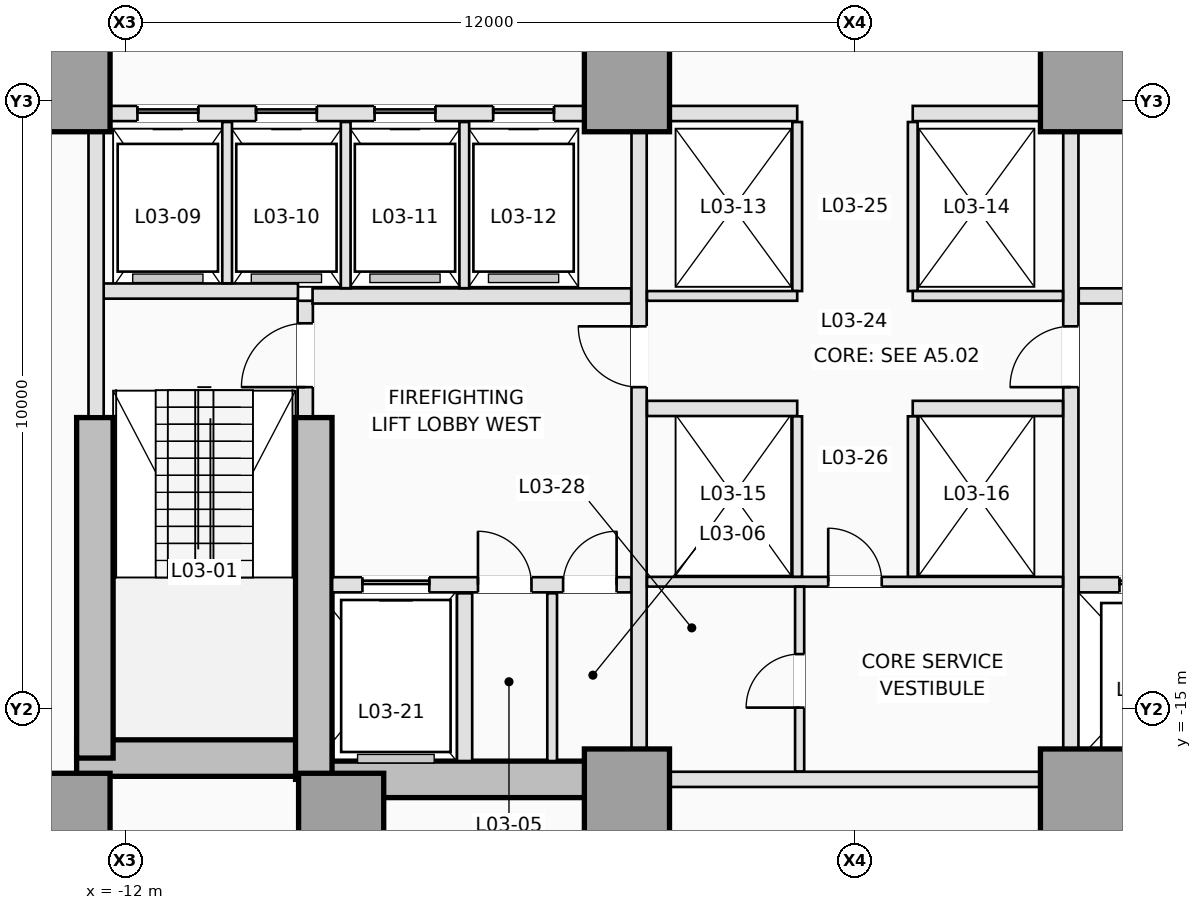
"""IFC4 building model, lengths in metres.
Left out: names, types, materials, properties, quantities, classifications, styles, units other than length and angle.
Written with IfcOpenShell. Run it as: python <this file> out.ifc"""

import sys

from ifc_helpers import new_model, si_unit, direction, frame, frame_2d, origin, origin_2d, place, context, subcontext, project, spatial, rectangle, extrude, element, fill, save


model = new_model("IFC4")
c1 = context("Model", 3, precision=1e-05, world=origin(), true_north=direction((0.0, 1.0)))
c2 = subcontext(c1, "Body", "Model", "MODEL_VIEW")
j1 = project(units=[si_unit("LENGTHUNIT", "METRE"), si_unit("PLANEANGLEUNIT", "RADIAN")], contexts=[c1])
p1 = place(None, origin())
s1 = spatial("IfcSite", under=j1, at=p1, CompositionType="ELEMENT")
p2 = place(p1, origin())
s2 = spatial("IfcBuilding", under=s1, at=p2, CompositionType="ELEMENT")
p3 = place(p2, frame((0.0, 0.0, 14.0)))
s3 = spatial("IfcBuildingStorey", under=s2, at=p3, CompositionType="ELEMENT", Elevation=14.0)
p4 = place(p3, frame((-12.8, -15.8, 0.0), z_axis=(0.0, 0.0, 1.0), x_axis=(1.0, 0.0, 0.0)))
e1 = element("IfcWall", 1, at=p4, inside=s3, PredefinedType="SHEAR", context=c2, shape_type="SweptSolid", body=[
    extrude(rectangle(XDim=4.2, YDim=0.6, at=frame_2d((2.1, 0.0))), origin(), (0.0, 0.0, 1.0), 4.5),
])
for number, where, z_axis, x_axis in (
    (2, (-8.9, -16.15, 0.0), (0.0, 0.0, 1.0), (1.0, 0.0, 0.0)),
    (3, (3.75, -16.15, 0.0), (0.0, 0.0, 1.0), (1.0, 0.0, 0.0)),
):
    element("IfcWall", number, at=place(p3, frame(where, z_axis=z_axis, x_axis=x_axis)), inside=s3, PredefinedType="SHEAR", context=c2, shape_type="SweptSolid", body=[
        extrude(rectangle(XDim=5.15, YDim=0.6, at=frame_2d((2.575, 0.0))), origin(), (0.0, 0.0, 1.0), 4.5),
    ])
p5 = place(p3, frame((-12.5, -15.8, 0.0), z_axis=(0.0, 0.0, 1.0), x_axis=(0.0, 1.0, 0.0)))
e4 = element("IfcWall", 4, at=p5, inside=s3, PredefinedType="SHEAR", context=c2, shape_type="SweptSolid", body=[
    extrude(rectangle(XDim=5.6, YDim=0.6, at=frame_2d((2.8, 0.0))), origin(), (0.0, 0.0, 1.0), 4.5),
])
p6 = place(p3, frame((-8.9, -16.15, 0.0), z_axis=(0.0, 0.0, 1.0), x_axis=(0.0, 1.0, 0.0)))
e5 = element("IfcWall", 5, at=p6, inside=s3, PredefinedType="SHEAR", context=c2, shape_type="SweptSolid", body=[
    extrude(rectangle(XDim=5.95, YDim=0.6, at=frame_2d((2.975, 0.0))), origin(), (0.0, 0.0, 1.0), 4.5),
])
for number, where, z_axis, x_axis in (
    (6, (-12.95, -16.75, 0.0), (0.0, 0.0, 1.0), (1.0, 0.0, 0.0)),
    (7, (-8.45, -16.75, 0.0), (0.0, 0.0, 1.0), (1.0, 0.0, 0.0)),
    (8, (-3.75, -16.35, 0.0), (0.0, 0.0, 1.0), (1.0, 0.0, 0.0)),
    (9, (3.75, -16.35, 0.0), (0.0, 0.0, 1.0), (1.0, 0.0, 0.0)),
    (10, (-12.95, -4.8, 0.0), (0.0, 0.0, 1.0), (1.0, 0.0, 0.0)),
    (11, (-3.75, -4.8, 0.0), (0.0, 0.0, 1.0), (1.0, 0.0, 0.0)),
    (12, (3.75, -4.8, 0.0), (0.0, 0.0, 1.0), (1.0, 0.0, 0.0)),
):
    element("IfcColumn", number, at=place(p3, frame(where, z_axis=z_axis, x_axis=x_axis)), inside=s3, PredefinedType="COLUMN", context=c2, shape_type="SweptSolid", body=[
        extrude(rectangle(XDim=1.4, YDim=1.4, at=origin_2d()), origin(), (0.0, 0.0, 1.0), 4.5),
    ])
p7 = place(p3, frame((-9.04, -10.18, 0.0), z_axis=(0.0, 0.0, 1.0), x_axis=(0.0, 1.0, 0.0)))
e13 = element("IfcWall", 13, at=p7, inside=s3, PredefinedType="PARTITIONING", context=c2, shape_type="SweptSolid", body=[
    extrude(rectangle(XDim=1.9, YDim=0.25, at=frame_2d((0.95, 0.0))), origin(), (0.0, 0.0, 1.0), 4.2),
])
p8 = place(p7, frame((0.48, 0.0, 0.0)))
e14 = element("IfcOpeningElement", 14, at=p8, cuts=e13, PredefinedType="OPENING", context=c2, shape_type="SweptSolid", body=[
    extrude(rectangle(XDim=1.05, YDim=2.15, at=frame_2d((0.525, 1.075))), frame((0.0, 0.135, 0.0), z_axis=(0.0, -1.0, 0.0), x_axis=(1.0, 0.0, 0.0)), (0.0, 0.0, 1.0), 0.27),
])
p9 = place(p3, frame((-12.38, -8.12, 0.0), z_axis=(0.0, 0.0, 1.0), x_axis=(1.0, 0.0, 0.0)))
e15 = element("IfcWall", 15, at=p9, inside=s3, PredefinedType="PARTITIONING", context=c2, shape_type="SweptSolid", body=[
    extrude(rectangle(XDim=3.22, YDim=0.25, at=frame_2d((1.61, 0.0))), origin(), (0.0, 0.0, 1.0), 4.2),
])
p10 = place(p3, frame((-12.48, -10.18, 0.0), z_axis=(0.0, 0.0, 1.0), x_axis=(0.0, 1.0, 0.0)))
e16 = element("IfcWall", 16, at=p10, inside=s3, PredefinedType="PARTITIONING", context=c2, shape_type="SweptSolid", body=[
    extrude(rectangle(XDim=4.678, YDim=0.25, at=frame_2d((2.339, 0.0))), origin(), (0.0, 0.0, 1.0), 4.2),
])
p11 = place(p3, frame((-8.598, -12.95, 0.0), z_axis=(0.0, 0.0, 1.0), x_axis=(1.0, 0.0, 0.0)))
e17 = element("IfcWall", 17, at=p11, inside=s3, PredefinedType="PARTITIONING", context=c2, shape_type="SweptSolid", body=[
    extrude(rectangle(XDim=4.918, YDim=0.25, at=frame_2d((2.459, 0.0))), origin(), (0.0, 0.0, 1.0), 4.2),
])
p12 = place(p11, frame((0.498, 0.0, 0.0)))
e18 = element("IfcOpeningElement", 18, at=p12, cuts=e17, PredefinedType="OPENING", context=c2, shape_type="SweptSolid", body=[
    extrude(rectangle(XDim=1.1, YDim=2.15, at=frame_2d((0.55, 1.075))), frame((0.0, 0.135, 0.0), z_axis=(0.0, -1.0, 0.0), x_axis=(1.0, 0.0, 0.0)), (0.0, 0.0, 1.0), 0.27),
])
p13 = place(p11, frame((2.398, 0.0, 0.0)))
e19 = element("IfcOpeningElement", 19, at=p13, cuts=e17, PredefinedType="OPENING", context=c2, shape_type="SweptSolid", body=[
    extrude(rectangle(XDim=0.88, YDim=2.1, at=frame_2d((0.44, 1.05))), frame((0.0, 0.135, 0.0), z_axis=(0.0, -1.0, 0.0), x_axis=(1.0, 0.0, 0.0)), (0.0, 0.0, 1.0), 0.27),
])
p14 = place(p11, frame((3.798, 0.0, 0.0)))
e20 = element("IfcOpeningElement", 20, at=p14, cuts=e17, PredefinedType="OPENING", context=c2, shape_type="SweptSolid", body=[
    extrude(rectangle(XDim=0.88, YDim=2.1, at=frame_2d((0.44, 1.05))), frame((0.0, 0.135, 0.0), z_axis=(0.0, -1.0, 0.0), x_axis=(1.0, 0.0, 0.0)), (0.0, 0.0, 1.0), 0.27),
])
p15 = place(p3, frame((3.68, -12.95, 0.0), z_axis=(0.0, 0.0, 1.0), x_axis=(1.0, 0.0, 0.0)))
e21 = element("IfcWall", 21, at=p15, inside=s3, PredefinedType="PARTITIONING", context=c2, shape_type="SweptSolid", body=[
    extrude(rectangle(XDim=4.918, YDim=0.25, at=frame_2d((2.459, 0.0))), origin(), (0.0, 0.0, 1.0), 4.2),
])
p16 = place(p15, frame((3.32, 0.0, 0.0)))
e22 = element("IfcOpeningElement", 22, at=p16, cuts=e21, PredefinedType="OPENING", context=c2, shape_type="SweptSolid", body=[
    extrude(rectangle(XDim=1.1, YDim=2.15, at=frame_2d((0.55, 1.075))), frame((0.0, 0.135, 0.0), z_axis=(0.0, -1.0, 0.0), x_axis=(1.0, 0.0, 0.0)), (0.0, 0.0, 1.0), 0.27),
])
p17 = place(p15, frame((0.67, 0.0, 0.0)))
e23 = element("IfcOpeningElement", 23, at=p17, cuts=e21, PredefinedType="OPENING", context=c2, shape_type="SweptSolid", body=[
    extrude(rectangle(XDim=1.2, YDim=2.15, at=frame_2d((0.6, 1.075))), frame((0.0, 0.135, 0.0), z_axis=(0.0, -1.0, 0.0), x_axis=(1.0, 0.0, 0.0)), (0.0, 0.0, 1.0), 0.27),
])
p18 = place(p3, frame((-6.42, -15.848, 0.0), z_axis=(0.0, 0.0, 1.0), x_axis=(0.0, 1.0, 0.0)))
e24 = element("IfcWall", 24, at=p18, inside=s3, PredefinedType="PARTITIONING", context=c2, shape_type="SweptSolid", body=[
    extrude(rectangle(XDim=2.758, YDim=0.25, at=frame_2d((1.379, 0.0))), origin(), (0.0, 0.0, 1.0), 4.2),
])
p19 = place(p3, frame((-4.98, -15.848, 0.0), z_axis=(0.0, 0.0, 1.0), x_axis=(0.0, 1.0, 0.0)))
e25 = element("IfcWall", 25, at=p19, inside=s3, PredefinedType="PARTITIONING", context=c2, shape_type="SweptSolid", body=[
    extrude(rectangle(XDim=2.758, YDim=0.16, at=frame_2d((1.379, 0.0))), origin(), (0.0, 0.0, 1.0), 4.2),
])
for number, where, z_axis, x_axis in (
    (26, (-8.92, -8.2, 0.0), (0.0, 0.0, 1.0), (1.0, 0.0, 0.0)),
    (27, (3.68, -8.2, 0.0), (0.0, 0.0, 1.0), (1.0, 0.0, 0.0)),
):
    element("IfcWall", number, at=place(p3, frame(where, z_axis=z_axis, x_axis=x_axis)), inside=s3, PredefinedType="PARTITIONING", context=c2, shape_type="SweptSolid", body=[
        extrude(rectangle(XDim=5.24, YDim=0.25, at=frame_2d((2.62, 0.0))), origin(), (0.0, 0.0, 1.0), 4.2),
    ])
p20 = place(p3, frame((-3.55, -15.648, 0.0), z_axis=(0.0, 0.0, 1.0), x_axis=(0.0, 1.0, 0.0)))
e28 = element("IfcWall", 28, at=p20, inside=s3, PredefinedType="PARTITIONING", context=c2, shape_type="SweptSolid", body=[
    extrude(rectangle(XDim=10.146, YDim=0.25, at=frame_2d((5.073, 0.0))), origin(), (0.0, 0.0, 1.0), 4.2),
])
p21 = place(p20, frame((5.948, 0.0, 0.0)))
e29 = element("IfcOpeningElement", 29, at=p21, cuts=e28, PredefinedType="OPENING", context=c2, shape_type="SweptSolid", body=[
    extrude(rectangle(XDim=1.0, YDim=2.15, at=frame_2d((0.5, 1.075))), frame((0.0, 0.135, 0.0), z_axis=(0.0, -1.0, 0.0), x_axis=(1.0, 0.0, 0.0)), (0.0, 0.0, 1.0), 0.27),
])
p22 = place(p3, frame((3.55, -15.648, 0.0), z_axis=(0.0, 0.0, 1.0), x_axis=(0.0, 1.0, 0.0)))
e30 = element("IfcWall", 30, at=p22, inside=s3, PredefinedType="PARTITIONING", context=c2, shape_type="SweptSolid", body=[
    extrude(rectangle(XDim=10.146, YDim=0.25, at=frame_2d((5.073, 0.0))), origin(), (0.0, 0.0, 1.0), 4.2),
])
p23 = place(p22, frame((5.948, 0.0, 0.0)))
e31 = element("IfcOpeningElement", 31, at=p23, cuts=e30, PredefinedType="OPENING", context=c2, shape_type="SweptSolid", body=[
    extrude(rectangle(XDim=1.0, YDim=2.15, at=frame_2d((0.5, 1.075))), frame((0.0, 0.135, 0.0), z_axis=(0.0, -1.0, 0.0), x_axis=(1.0, 0.0, 0.0)), (0.0, 0.0, 1.0), 0.27),
])
p24 = place(p3, frame((-12.248, -5.2, 0.0), z_axis=(0.0, 0.0, 1.0), x_axis=(1.0, 0.0, 0.0)))
e32 = element("IfcWall", 32, at=p24, inside=s3, PredefinedType="PARTITIONING", context=c2, shape_type="SweptSolid", body=[
    extrude(rectangle(XDim=7.796, YDim=0.25, at=frame_2d((3.898, 0.0))), origin(), (0.0, 0.0, 1.0), 4.2),
])
p25 = place(p24, frame((0.448, 0.0, 0.0)))
e33 = element("IfcOpeningElement", 33, at=p25, cuts=e32, PredefinedType="OPENING", context=c2, shape_type="SweptSolid", body=[
    extrude(rectangle(XDim=1.0, YDim=2.15, at=frame_2d((0.5, 1.075))), frame((0.0, 0.135, 0.0), z_axis=(0.0, -1.0, 0.0), x_axis=(1.0, 0.0, 0.0)), (0.0, 0.0, 1.0), 0.27),
])
p26 = place(p24, frame((2.398, 0.0, 0.0)))
e34 = element("IfcOpeningElement", 34, at=p26, cuts=e32, PredefinedType="OPENING", context=c2, shape_type="SweptSolid", body=[
    extrude(rectangle(XDim=1.0, YDim=2.15, at=frame_2d((0.5, 1.075))), frame((0.0, 0.135, 0.0), z_axis=(0.0, -1.0, 0.0), x_axis=(1.0, 0.0, 0.0)), (0.0, 0.0, 1.0), 0.27),
])
p27 = place(p24, frame((4.348, 0.0, 0.0)))
e35 = element("IfcOpeningElement", 35, at=p27, cuts=e32, PredefinedType="OPENING", context=c2, shape_type="SweptSolid", body=[
    extrude(rectangle(XDim=1.0, YDim=2.15, at=frame_2d((0.5, 1.075))), frame((0.0, 0.135, 0.0), z_axis=(0.0, -1.0, 0.0), x_axis=(1.0, 0.0, 0.0)), (0.0, 0.0, 1.0), 0.27),
])
p28 = place(p24, frame((6.298, 0.0, 0.0)))
e36 = element("IfcOpeningElement", 36, at=p28, cuts=e32, PredefinedType="OPENING", context=c2, shape_type="SweptSolid", body=[
    extrude(rectangle(XDim=1.0, YDim=2.15, at=frame_2d((0.5, 1.075))), frame((0.0, 0.135, 0.0), z_axis=(0.0, -1.0, 0.0), x_axis=(1.0, 0.0, 0.0)), (0.0, 0.0, 1.0), 0.27),
])
for number, where, z_axis, x_axis in (
    (37, (-3.048, -5.2, 0.0), (0.0, 0.0, 1.0), (1.0, 0.0, 0.0)),
    (38, (0.95, -5.2, 0.0), (0.0, 0.0, 1.0), (1.0, 0.0, 0.0)),
):
    element("IfcWall", number, at=place(p3, frame(where, z_axis=z_axis, x_axis=x_axis)), inside=s3, PredefinedType="PARTITIONING", context=c2, shape_type="SweptSolid", body=[
        extrude(rectangle(XDim=2.098, YDim=0.25, at=frame_2d((1.049, 0.0))), origin(), (0.0, 0.0, 1.0), 4.2),
    ])
p29 = place(p3, frame((-10.325, -7.993, 0.0), z_axis=(0.0, 0.0, 1.0), x_axis=(0.0, 1.0, 0.0)))
e39 = element("IfcWall", 39, at=p29, inside=s3, PredefinedType="PARTITIONING", context=c2, shape_type="SweptSolid", body=[
    extrude(rectangle(XDim=2.653, YDim=0.16, at=frame_2d((1.326, 0.0))), origin(), (0.0, 0.0, 1.0), 4.2),
])
for number, where, z_axis, x_axis in (
    (40, (-8.375, -8.073, 0.0), (0.0, 0.0, 1.0), (0.0, 1.0, 0.0)),
    (41, (-6.425, -8.073, 0.0), (0.0, 0.0, 1.0), (0.0, 1.0, 0.0)),
):
    element("IfcWall", number, at=place(p3, frame(where, z_axis=z_axis, x_axis=x_axis)), inside=s3, PredefinedType="PARTITIONING", context=c2, shape_type="SweptSolid", body=[
        extrude(rectangle(XDim=2.733, YDim=0.16, at=frame_2d((1.366, 0.0))), origin(), (0.0, 0.0, 1.0), 4.2),
    ])
p30 = place(p3, frame((-3.048, -16.15, 0.0), z_axis=(0.0, 0.0, 1.0), x_axis=(1.0, 0.0, 0.0)))
e42 = element("IfcWall", 42, at=p30, inside=s3, PredefinedType="PARTITIONING", context=c2, shape_type="SweptSolid", body=[
    extrude(rectangle(XDim=6.096, YDim=0.25, at=frame_2d((3.048, 0.0))), origin(), (0.0, 0.0, 1.0), 3.176),
])
for number, where, z_axis, x_axis in (
    (43, (-0.95, -8.12, 0.0), (0.0, 0.0, 1.0), (0.0, 1.0, 0.0)),
    (44, (0.95, -8.12, 0.0), (0.0, 0.0, 1.0), (0.0, 1.0, 0.0)),
):
    element("IfcWall", number, at=place(p3, frame(where, z_axis=z_axis, x_axis=x_axis)), inside=s3, PredefinedType="PARTITIONING", context=c2, shape_type="SweptSolid", body=[
        extrude(rectangle(XDim=2.78, YDim=0.16, at=frame_2d((1.39, 0.0))), origin(), (0.0, 0.0, 1.0), 4.2),
    ])
for number, where, z_axis, x_axis in (
    (45, (-3.42, -8.2, 0.0), (0.0, 0.0, 1.0), (1.0, 0.0, 0.0)),
    (46, (0.95, -8.2, 0.0), (0.0, 0.0, 1.0), (1.0, 0.0, 0.0)),
):
    element("IfcWall", number, at=place(p3, frame(where, z_axis=z_axis, x_axis=x_axis)), inside=s3, PredefinedType="PARTITIONING", context=c2, shape_type="SweptSolid", body=[
        extrude(rectangle(XDim=2.47, YDim=0.16, at=frame_2d((1.235, 0.0))), origin(), (0.0, 0.0, 1.0), 4.2),
    ])
for number, where, z_axis, x_axis in (
    (47, (-3.42, -10.05, 0.0), (0.0, 0.0, 1.0), (1.0, 0.0, 0.0)),
    (48, (0.95, -10.05, 0.0), (0.0, 0.0, 1.0), (1.0, 0.0, 0.0)),
):
    element("IfcWall", number, at=place(p3, frame(where, z_axis=z_axis, x_axis=x_axis)), inside=s3, PredefinedType="PARTITIONING", context=c2, shape_type="SweptSolid", body=[
        extrude(rectangle(XDim=2.47, YDim=0.25, at=frame_2d((1.235, 0.0))), origin(), (0.0, 0.0, 1.0), 4.2),
    ])
p31 = place(p3, frame((-3.42, -12.9, 0.0), z_axis=(0.0, 0.0, 1.0), x_axis=(1.0, 0.0, 0.0)))
e49 = element("IfcWall", 49, at=p31, inside=s3, PredefinedType="PARTITIONING", context=c2, shape_type="SweptSolid", body=[
    extrude(rectangle(XDim=6.84, YDim=0.16, at=frame_2d((3.42, 0.0))), origin(), (0.0, 0.0, 1.0), 4.2),
])
p32 = place(p31, frame((2.98, 0.0, 0.0)))
e50 = element("IfcOpeningElement", 50, at=p32, cuts=e49, PredefinedType="OPENING", context=c2, shape_type="SweptSolid", body=[
    extrude(rectangle(XDim=0.88, YDim=2.12, at=frame_2d((0.44, 1.06))), frame((0.0, 0.09, 0.0), z_axis=(0.0, -1.0, 0.0), x_axis=(1.0, 0.0, 0.0)), (0.0, 0.0, 1.0), 0.18),
])
for number, where, z_axis, x_axis in (
    (51, (-0.95, -12.818, 0.0), (0.0, 0.0, 1.0), (0.0, 1.0, 0.0)),
    (52, (0.95, -12.818, 0.0), (0.0, 0.0, 1.0), (0.0, 1.0, 0.0)),
):
    element("IfcWall", number, at=place(p3, frame(where, z_axis=z_axis, x_axis=x_axis)), inside=s3, PredefinedType="PARTITIONING", context=c2, shape_type="SweptSolid", body=[
        extrude(rectangle(XDim=2.638, YDim=0.16, at=frame_2d((1.319, 0.0))), origin(), (0.0, 0.0, 1.0), 4.2),
    ])
p33 = place(p3, frame((-0.91, -16.02, 0.0), z_axis=(0.0, 0.0, 1.0), x_axis=(0.0, 1.0, 0.0)))
e53 = element("IfcWall", 53, at=p33, inside=s3, PredefinedType="PARTITIONING", context=c2, shape_type="SweptSolid", body=[
    extrude(rectangle(XDim=3.038, YDim=0.15, at=frame_2d((1.519, 0.0))), origin(), (0.0, 0.0, 1.0), 4.2),
])
p34 = place(p33, frame((1.05, 0.0, 0.0)))
e54 = element("IfcOpeningElement", 54, at=p34, cuts=e53, PredefinedType="OPENING", context=c2, shape_type="SweptSolid", body=[
    extrude(rectangle(XDim=0.88, YDim=2.12, at=frame_2d((0.44, 1.06))), frame((0.0, 0.085, 0.0), z_axis=(0.0, -1.0, 0.0), x_axis=(1.0, 0.0, 0.0)), (0.0, 0.0, 1.0), 0.17),
])
p35 = place(p25, origin())
e55 = element("IfcDoor", 55, at=p35, inside=s3, OperationType="SLIDING_TO_LEFT", PredefinedType="DOOR", context=c2, shape_type="SweptSolid", body=[
    extrude(rectangle(XDim=1.0, YDim=2.15, at=frame_2d((0.5, 1.075))), frame((0.0, 0.025, 0.0), z_axis=(0.0, -1.0, 0.0), x_axis=(1.0, 0.0, 0.0)), (0.0, 0.0, 1.0), 0.05),
])
fill(e33, e55)
p36 = place(p26, origin())
e56 = element("IfcDoor", 56, at=p36, inside=s3, OperationType="SLIDING_TO_LEFT", PredefinedType="DOOR", context=c2, shape_type="SweptSolid", body=[
    extrude(rectangle(XDim=1.0, YDim=2.15, at=frame_2d((0.5, 1.075))), frame((0.0, 0.025, 0.0), z_axis=(0.0, -1.0, 0.0), x_axis=(1.0, 0.0, 0.0)), (0.0, 0.0, 1.0), 0.05),
])
fill(e34, e56)
p37 = place(p27, origin())
e57 = element("IfcDoor", 57, at=p37, inside=s3, OperationType="SLIDING_TO_LEFT", PredefinedType="DOOR", context=c2, shape_type="SweptSolid", body=[
    extrude(rectangle(XDim=1.0, YDim=2.15, at=frame_2d((0.5, 1.075))), frame((0.0, 0.025, 0.0), z_axis=(0.0, -1.0, 0.0), x_axis=(1.0, 0.0, 0.0)), (0.0, 0.0, 1.0), 0.05),
])
fill(e35, e57)
p38 = place(p28, origin())
e58 = element("IfcDoor", 58, at=p38, inside=s3, OperationType="SLIDING_TO_LEFT", PredefinedType="DOOR", context=c2, shape_type="SweptSolid", body=[
    extrude(rectangle(XDim=1.0, YDim=2.15, at=frame_2d((0.5, 1.075))), frame((0.0, 0.025, 0.0), z_axis=(0.0, -1.0, 0.0), x_axis=(1.0, 0.0, 0.0)), (0.0, 0.0, 1.0), 0.05),
])
fill(e36, e58)
p39 = place(p12, origin())
e59 = element("IfcDoor", 59, at=p39, inside=s3, OperationType="SLIDING_TO_LEFT", PredefinedType="DOOR", context=c2, shape_type="SweptSolid", body=[
    extrude(rectangle(XDim=1.1, YDim=2.15, at=frame_2d((0.55, 1.075))), frame((0.0, 0.025, 0.0), z_axis=(0.0, -1.0, 0.0), x_axis=(1.0, 0.0, 0.0)), (0.0, 0.0, 1.0), 0.05),
])
fill(e18, e59)
p40 = place(p17, origin())
e60 = element("IfcDoor", 60, at=p40, inside=s3, OperationType="SLIDING_TO_LEFT", PredefinedType="DOOR", context=c2, shape_type="SweptSolid", body=[
    extrude(rectangle(XDim=1.2, YDim=2.15, at=frame_2d((0.6, 1.075))), frame((0.0, 0.025, 0.0), z_axis=(0.0, -1.0, 0.0), x_axis=(1.0, 0.0, 0.0)), (0.0, 0.0, 1.0), 0.05),
])
fill(e23, e60)
p41 = place(p8, origin())
e61 = element("IfcDoor", 61, at=p41, inside=s3, OperationType="SINGLE_SWING_LEFT", PredefinedType="DOOR", context=c2, shape_type="SweptSolid", body=[
    extrude(rectangle(XDim=1.05, YDim=2.15, at=frame_2d((0.525, 1.075))), frame((0.0, 0.025, 0.0), z_axis=(0.0, -1.0, 0.0), x_axis=(1.0, 0.0, 0.0)), (0.0, 0.0, 1.0), 0.05),
])
fill(e14, e61)
p42 = place(p13, origin())
e62 = element("IfcDoor", 62, at=p42, inside=s3, OperationType="SINGLE_SWING_LEFT", PredefinedType="TRAPDOOR", context=c2, shape_type="SweptSolid", body=[
    extrude(rectangle(XDim=0.88, YDim=2.1, at=frame_2d((0.44, 1.05))), frame((0.0, 0.025, 0.0), z_axis=(0.0, -1.0, 0.0), x_axis=(1.0, 0.0, 0.0)), (0.0, 0.0, 1.0), 0.05),
])
fill(e19, e62)
p43 = place(p14, origin())
e63 = element("IfcDoor", 63, at=p43, inside=s3, OperationType="SINGLE_SWING_RIGHT", PredefinedType="TRAPDOOR", context=c2, shape_type="SweptSolid", body=[
    extrude(rectangle(XDim=0.88, YDim=2.1, at=frame_2d((0.44, 1.05))), frame((0.0, 0.025, 0.0), z_axis=(0.0, -1.0, 0.0), x_axis=(1.0, 0.0, 0.0)), (0.0, 0.0, 1.0), 0.05),
])
fill(e20, e63)
p44 = place(p21, origin())
e64 = element("IfcDoor", 64, at=p44, inside=s3, OperationType="SINGLE_SWING_RIGHT", PredefinedType="DOOR", context=c2, shape_type="SweptSolid", body=[
    extrude(rectangle(XDim=1.0, YDim=2.15, at=frame_2d((0.5, 1.075))), frame((0.0, 0.025, 0.0), z_axis=(0.0, -1.0, 0.0), x_axis=(1.0, 0.0, 0.0)), (0.0, 0.0, 1.0), 0.05),
])
fill(e29, e64)
p45 = place(p23, origin())
e65 = element("IfcDoor", 65, at=p45, inside=s3, OperationType="SINGLE_SWING_LEFT", PredefinedType="DOOR", context=c2, shape_type="SweptSolid", body=[
    extrude(rectangle(XDim=1.0, YDim=2.15, at=frame_2d((0.5, 1.075))), frame((0.0, 0.025, 0.0), z_axis=(0.0, -1.0, 0.0), x_axis=(1.0, 0.0, 0.0)), (0.0, 0.0, 1.0), 0.05),
])
fill(e31, e65)
p46 = place(p32, origin())
e66 = element("IfcDoor", 66, at=p46, inside=s3, OperationType="SINGLE_SWING_LEFT", PredefinedType="DOOR", context=c2, shape_type="SweptSolid", body=[
    extrude(rectangle(XDim=0.88, YDim=2.12, at=frame_2d((0.44, 1.06))), frame((0.0, 0.025, 0.0), z_axis=(0.0, -1.0, 0.0), x_axis=(1.0, 0.0, 0.0)), (0.0, 0.0, 1.0), 0.05),
])
fill(e50, e66)
p47 = place(p34, origin())
e67 = element("IfcDoor", 67, at=p47, inside=s3, OperationType="SINGLE_SWING_LEFT", PredefinedType="DOOR", context=c2, shape_type="SweptSolid", body=[
    extrude(rectangle(XDim=0.88, YDim=2.12, at=frame_2d((0.44, 1.06))), frame((0.0, 0.025, 0.0), z_axis=(0.0, -1.0, 0.0), x_axis=(1.0, 0.0, 0.0)), (0.0, 0.0, 1.0), 0.05),
])
fill(e54, e67)
save(model, sys.argv[1])
